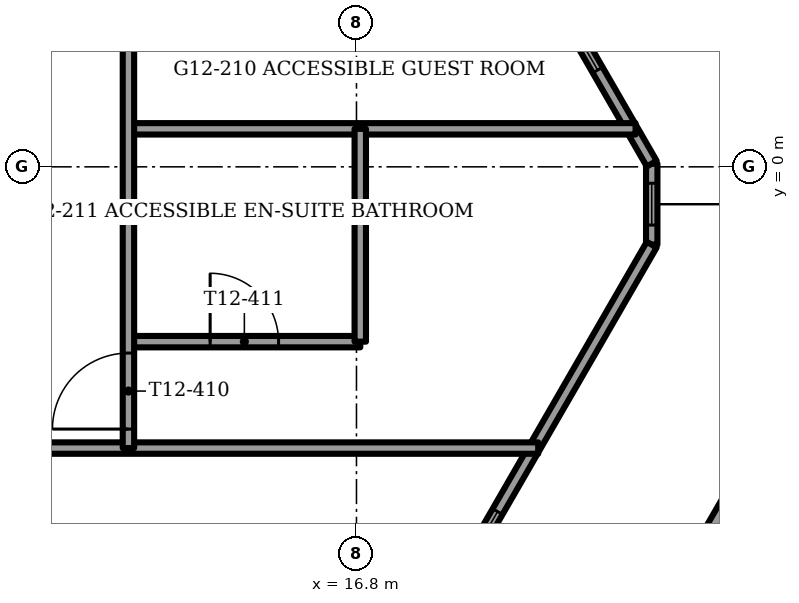
"""IFC4 building model, lengths in metres.
Left out: names, types, materials, properties, quantities, classifications, styles, units other than length and angle.
Written with IfcOpenShell. Run it as: python <this file> out.ifc"""

import sys

from ifc_helpers import new_model, si_unit, direction, frame, frame_2d, origin, place, context, subcontext, project, spatial, rectangle, extrude, element, fill, save


model = new_model("IFC4")
c1 = context("Model", 3, precision=1e-05, world=origin(), true_north=direction((0.0, 1.0)))
c2 = subcontext(c1, "Body", "Model", "MODEL_VIEW")
j1 = project(units=[si_unit("LENGTHUNIT", "METRE"), si_unit("PLANEANGLEUNIT", "RADIAN")], contexts=[c1])
p1 = place(None, origin())
s1 = spatial("IfcSite", under=j1, at=p1, CompositionType="ELEMENT")
p2 = place(p1, origin())
s2 = spatial("IfcBuilding", under=s1, at=p2, CompositionType="ELEMENT")
p3 = place(p2, frame((0.0, 0.0, 50.5)))
s3 = spatial("IfcBuildingStorey", under=s2, at=p3, CompositionType="ELEMENT", Elevation=50.5)
p4 = place(p3, frame((20.922, -6.461, 0.0), z_axis=(0.0, 0.0, 1.0), x_axis=(0.500007141444, 0.86602128063, 0.0)))
e1 = element("IfcWall", 1, at=p4, inside=s3, PredefinedType="PARAPET", context=c2, shape_type="SweptSolid", body=[
    extrude(rectangle(XDim=6.137, YDim=0.9, at=frame_2d((3.068, 0.0))), origin(), (0.0, 0.0, 1.0), 1.1),
])
p5 = place(p3, frame((23.991, 0.165, 0.0), z_axis=(0.0, 0.0, 1.0), x_axis=(-0.499983583635, 0.86603488157, 0.0)))
e2 = element("IfcWall", 2, at=p5, inside=s3, PredefinedType="PARAPET", context=c2, shape_type="SweptSolid", body=[
    extrude(rectangle(XDim=6.987, YDim=0.9, at=frame_2d((3.494, 0.0))), origin(), (0.0, 0.0, 1.0), 1.1),
])
p6 = place(p3, frame((11.229, -17.402, 0.0), z_axis=(0.0, 0.0, 1.0), x_axis=(0.500004426522, 0.866022848116, 0.0)))
e3 = element("IfcWall", 3, at=p6, inside=s3, PredefinedType="SOLIDWALL", context=c2, shape_type="SweptSolid", body=[
    extrude(rectangle(XDim=18.912, YDim=0.15, at=frame_2d((9.456, 0.0))), origin(), (0.0, 0.0, 1.0), 3.45),
])
p7 = place(p6, frame((1.356, 0.0, 0.15)))
e4 = element("IfcOpeningElement", 4, at=p7, cuts=e3, PredefinedType="OPENING", context=c2, shape_type="SweptSolid", body=[
    extrude(rectangle(XDim=1.8, YDim=2.85, at=frame_2d((0.9, 1.425))), frame((0.0, 0.075, 0.0), z_axis=(0.0, -1.0, 0.0), x_axis=(1.0, 0.0, 0.0)), (0.0, 0.0, 1.0), 0.15),
])
p8 = place(p6, frame((3.456, 0.0, 0.0)))
e5 = element("IfcOpeningElement", 5, at=p8, cuts=e3, PredefinedType="OPENING", context=c2, shape_type="SweptSolid", body=[
    extrude(rectangle(XDim=1.5, YDim=2.4, at=frame_2d((0.75, 1.2))), frame((0.0, 0.075, 0.0), z_axis=(0.0, -1.0, 0.0), x_axis=(1.0, 0.0, 0.0)), (0.0, 0.0, 1.0), 0.15),
])
p9 = place(p6, frame((5.556, 0.0, 0.15)))
e6 = element("IfcOpeningElement", 6, at=p9, cuts=e3, PredefinedType="OPENING", context=c2, shape_type="SweptSolid", body=[
    extrude(rectangle(XDim=1.8, YDim=2.85, at=frame_2d((0.9, 1.425))), frame((0.0, 0.075, 0.0), z_axis=(0.0, -1.0, 0.0), x_axis=(1.0, 0.0, 0.0)), (0.0, 0.0, 1.0), 0.15),
])
p10 = place(p6, frame((7.656, 0.0, 0.0)))
e7 = element("IfcOpeningElement", 7, at=p10, cuts=e3, PredefinedType="OPENING", context=c2, shape_type="SweptSolid", body=[
    extrude(rectangle(XDim=1.5, YDim=2.4, at=frame_2d((0.75, 1.2))), frame((0.0, 0.075, 0.0), z_axis=(0.0, -1.0, 0.0), x_axis=(1.0, 0.0, 0.0)), (0.0, 0.0, 1.0), 0.15),
])
p11 = place(p6, frame((9.756, 0.0, 0.15)))
e8 = element("IfcOpeningElement", 8, at=p11, cuts=e3, PredefinedType="OPENING", context=c2, shape_type="SweptSolid", body=[
    extrude(rectangle(XDim=1.8, YDim=2.85, at=frame_2d((0.9, 1.425))), frame((0.0, 0.075, 0.0), z_axis=(0.0, -1.0, 0.0), x_axis=(1.0, 0.0, 0.0)), (0.0, 0.0, 1.0), 0.15),
])
p12 = place(p6, frame((11.856, 0.0, 0.0)))
e9 = element("IfcOpeningElement", 9, at=p12, cuts=e3, PredefinedType="OPENING", context=c2, shape_type="SweptSolid", body=[
    extrude(rectangle(XDim=1.5, YDim=2.4, at=frame_2d((0.75, 1.2))), frame((0.0, 0.075, 0.0), z_axis=(0.0, -1.0, 0.0), x_axis=(1.0, 0.0, 0.0)), (0.0, 0.0, 1.0), 0.15),
])
p13 = place(p6, frame((13.956, 0.0, 0.15)))
e10 = element("IfcOpeningElement", 10, at=p13, cuts=e3, PredefinedType="OPENING", context=c2, shape_type="SweptSolid", body=[
    extrude(rectangle(XDim=0.9, YDim=2.85, at=frame_2d((0.45, 1.425))), frame((0.0, 0.075, 0.0), z_axis=(0.0, -1.0, 0.0), x_axis=(1.0, 0.0, 0.0)), (0.0, 0.0, 1.0), 0.15),
])
p14 = place(p3, frame((20.685, 0.042, 0.0), z_axis=(0.0, 0.0, 1.0), x_axis=(-0.49999960747, 0.866025630412, 0.0)))
e11 = element("IfcWall", 11, at=p14, inside=s3, PredefinedType="SOLIDWALL", context=c2, shape_type="SweptSolid", body=[
    extrude(rectangle(XDim=23.384, YDim=0.15, at=frame_2d((11.692, 0.0))), origin(), (0.0, 0.0, 1.0), 3.45),
])
p15 = place(p14, frame((4.491, 0.0, 0.15)))
e12 = element("IfcOpeningElement", 12, at=p15, cuts=e11, PredefinedType="OPENING", context=c2, shape_type="SweptSolid", body=[
    extrude(rectangle(XDim=1.8, YDim=2.85, at=frame_2d((0.9, 1.425))), frame((0.0, 0.075, 0.0), z_axis=(0.0, -1.0, 0.0), x_axis=(1.0, 0.0, 0.0)), (0.0, 0.0, 1.0), 0.15),
])
p16 = place(p14, frame((6.406, 0.0, 0.15)))
e13 = element("IfcOpeningElement", 13, at=p16, cuts=e11, PredefinedType="OPENING", context=c2, shape_type="SweptSolid", body=[
    extrude(rectangle(XDim=1.5, YDim=2.85, at=frame_2d((0.75, 1.425))), frame((0.0, 0.075, 0.0), z_axis=(0.0, -1.0, 0.0), x_axis=(1.0, 0.0, 0.0)), (0.0, 0.0, 1.0), 0.15),
])
p17 = place(p14, frame((8.506, 0.0, 0.15)))
e14 = element("IfcOpeningElement", 14, at=p17, cuts=e11, PredefinedType="OPENING", context=c2, shape_type="SweptSolid", body=[
    extrude(rectangle(XDim=1.8, YDim=2.85, at=frame_2d((0.9, 1.425))), frame((0.0, 0.075, 0.0), z_axis=(0.0, -1.0, 0.0), x_axis=(1.0, 0.0, 0.0)), (0.0, 0.0, 1.0), 0.15),
])
p18 = place(p14, frame((10.606, 0.0, 0.15)))
e15 = element("IfcOpeningElement", 15, at=p18, cuts=e11, PredefinedType="OPENING", context=c2, shape_type="SweptSolid", body=[
    extrude(rectangle(XDim=1.5, YDim=2.85, at=frame_2d((0.75, 1.425))), frame((0.0, 0.075, 0.0), z_axis=(0.0, -1.0, 0.0), x_axis=(1.0, 0.0, 0.0)), (0.0, 0.0, 1.0), 0.15),
])
p19 = place(p14, frame((14.806, 0.0, 0.15)))
e16 = element("IfcOpeningElement", 16, at=p19, cuts=e11, PredefinedType="OPENING", context=c2, shape_type="SweptSolid", body=[
    extrude(rectangle(XDim=1.5, YDim=2.85, at=frame_2d((0.75, 1.425))), frame((0.0, 0.075, 0.0), z_axis=(0.0, -1.0, 0.0), x_axis=(1.0, 0.0, 0.0)), (0.0, 0.0, 1.0), 0.15),
])
p20 = place(p14, frame((18.861, 0.0, 0.15)))
e17 = element("IfcOpeningElement", 17, at=p20, cuts=e11, PredefinedType="OPENING", context=c2, shape_type="SweptSolid", body=[
    extrude(rectangle(XDim=1.5, YDim=2.85, at=frame_2d((0.75, 1.425))), frame((0.0, 0.075, 0.0), z_axis=(0.0, -1.0, 0.0), x_axis=(1.0, 0.0, 0.0)), (0.0, 0.0, 1.0), 0.15),
])
p21 = place(p14, frame((1.422, 0.0, 0.15)))
e18 = element("IfcOpeningElement", 18, at=p21, cuts=e11, PredefinedType="OPENING", context=c2, shape_type="SweptSolid", body=[
    extrude(rectangle(XDim=1.8, YDim=2.73, at=frame_2d((0.9, 1.365))), frame((0.0, 0.075, 0.0), z_axis=(0.0, -1.0, 0.0), x_axis=(1.0, 0.0, 0.0)), (0.0, 0.0, 1.0), 0.15),
])
p22 = place(p14, frame((21.247, 0.0, 0.15)))
e19 = element("IfcOpeningElement", 19, at=p22, cuts=e11, PredefinedType="OPENING", context=c2, shape_type="SweptSolid", body=[
    extrude(rectangle(XDim=1.8, YDim=2.73, at=frame_2d((0.9, 1.365))), frame((0.0, 0.075, 0.0), z_axis=(0.0, -1.0, 0.0), x_axis=(1.0, 0.0, 0.0)), (0.0, 0.0, 1.0), 0.15),
])
p23 = place(p3, frame((20.685, -1.023, 0.0), z_axis=(0.0, 0.0, 1.0), x_axis=(0.0, 1.0, 0.0)))
e20 = element("IfcWall", 20, at=p23, inside=s3, PredefinedType="SOLIDWALL", context=c2, shape_type="SweptSolid", body=[
    extrude(rectangle(XDim=1.065, YDim=0.15, at=frame_2d((0.532, 0.0))), origin(), (0.0, 0.0, 1.0), 3.45),
])
p24 = place(p23, frame((0.258, 0.0, 0.15)))
e21 = element("IfcOpeningElement", 21, at=p24, cuts=e20, PredefinedType="OPENING", context=c2, shape_type="SweptSolid", body=[
    extrude(rectangle(XDim=0.55, YDim=2.85, at=frame_2d((0.275, 1.425))), frame((0.0, 0.075, 0.0), z_axis=(0.0, -1.0, 0.0), x_axis=(1.0, 0.0, 0.0)), (0.0, 0.0, 1.0), 0.15),
])
p25 = place(p3, frame((9.16, -3.7, 0.0), z_axis=(0.0, 0.0, 1.0), x_axis=(1.0, 0.0, 0.0)))
e22 = element("IfcWall", 22, at=p25, inside=s3, PredefinedType="PARTITIONING", context=c2, shape_type="SweptSolid", body=[
    extrude(rectangle(XDim=10.031, YDim=0.15, at=frame_2d((5.016, 0.0))), origin(), (0.0, 0.0, 1.0), 3.45),
])
p26 = place(p25, frame((1.84, 0.0, 0.0)))
e23 = element("IfcOpeningElement", 23, at=p26, cuts=e22, PredefinedType="OPENING", context=c2, shape_type="SweptSolid", body=[
    extrude(rectangle(XDim=1.0, YDim=2.1, at=frame_2d((0.5, 1.05))), frame((0.0, 0.075, 0.0), z_axis=(0.0, -1.0, 0.0), x_axis=(1.0, 0.0, 0.0)), (0.0, 0.0, 1.0), 0.15),
])
p27 = place(p3, frame((13.8, -2.3, 0.0), z_axis=(0.0, 0.0, 1.0), x_axis=(1.0, 0.0, 0.0)))
e24 = element("IfcWall", 24, at=p27, inside=s3, PredefinedType="PARTITIONING", context=c2, shape_type="SweptSolid", body=[
    extrude(rectangle(XDim=3.05, YDim=0.15, at=frame_2d((1.525, 0.0))), origin(), (0.0, 0.0, 1.0), 3.45),
])
p28 = place(p27, frame((1.075, 0.0, 0.0)))
e25 = element("IfcOpeningElement", 25, at=p28, cuts=e24, PredefinedType="OPENING", context=c2, shape_type="SweptSolid", body=[
    extrude(rectangle(XDim=0.9, YDim=2.1, at=frame_2d((0.45, 1.05))), frame((0.0, 0.075, 0.0), z_axis=(0.0, -1.0, 0.0), x_axis=(1.0, 0.0, 0.0)), (0.0, 0.0, 1.0), 0.15),
])
p29 = place(p3, frame((13.8, 0.5, 0.0), z_axis=(0.0, 0.0, 1.0), x_axis=(1.0, 0.0, 0.0)))
e26 = element("IfcWall", 26, at=p29, inside=s3, PredefinedType="PARTITIONING", context=c2, shape_type="SweptSolid", body=[
    extrude(rectangle(XDim=6.672, YDim=0.15, at=frame_2d((3.336, 0.0))), origin(), (0.0, 0.0, 1.0), 3.45),
])
p30 = place(p3, frame((16.85, -2.3, 0.0), z_axis=(0.0, 0.0, 1.0), x_axis=(0.0, 1.0, 0.0)))
e27 = element("IfcWall", 27, at=p30, inside=s3, PredefinedType="PARTITIONING", context=c2, shape_type="SweptSolid", body=[
    extrude(rectangle(XDim=2.8, YDim=0.15, at=frame_2d((1.4, 0.0))), origin(), (0.0, 0.0, 1.0), 3.45),
])
p31 = place(p3, frame((13.8, -3.7, 0.0), z_axis=(0.0, 0.0, 1.0), x_axis=(0.0, 1.0, 0.0)))
e28 = element("IfcWall", 28, at=p31, inside=s3, PredefinedType="PARTITIONING", context=c2, shape_type="SweptSolid", body=[
    extrude(rectangle(XDim=15.756, YDim=0.15, at=frame_2d((7.878, 0.0))), origin(), (0.0, 0.0, 1.0), 3.45),
])
p32 = place(p31, frame((0.25, 0.0, 0.0)))
e29 = element("IfcOpeningElement", 29, at=p32, cuts=e28, PredefinedType="OPENING", context=c2, shape_type="SweptSolid", body=[
    extrude(rectangle(XDim=1.0, YDim=2.1, at=frame_2d((0.5, 1.05))), frame((0.0, 0.075, 0.0), z_axis=(0.0, -1.0, 0.0), x_axis=(1.0, 0.0, 0.0)), (0.0, 0.0, 1.0), 0.15),
])
p33 = place(p31, frame((5.275, 0.0, 0.0)))
e30 = element("IfcOpeningElement", 30, at=p33, cuts=e28, PredefinedType="OPENING", context=c2, shape_type="SweptSolid", body=[
    extrude(rectangle(XDim=1.0, YDim=2.1, at=frame_2d((0.5, 1.05))), frame((0.0, 0.075, 0.0), z_axis=(0.0, -1.0, 0.0), x_axis=(1.0, 0.0, 0.0)), (0.0, 0.0, 1.0), 0.15),
])
p34 = place(p31, frame((10.933, 0.0, 0.0)))
e31 = element("IfcOpeningElement", 31, at=p34, cuts=e28, PredefinedType="OPENING", context=c2, shape_type="SweptSolid", body=[
    extrude(rectangle(XDim=1.0, YDim=2.1, at=frame_2d((0.5, 1.05))), frame((0.0, 0.075, 0.0), z_axis=(0.0, -1.0, 0.0), x_axis=(1.0, 0.0, 0.0)), (0.0, 0.0, 1.0), 0.15),
])
p35 = place(p13, origin())
e32 = element("IfcWindow", 32, at=p35, inside=s3, PartitioningType="SINGLE_PANEL", PredefinedType="WINDOW", context=c2, shape_type="SweptSolid", body=[
    extrude(rectangle(XDim=0.9, YDim=2.85, at=frame_2d((0.45, 1.425))), frame((0.0, 0.03, 0.0), z_axis=(0.0, -1.0, 0.0), x_axis=(1.0, 0.0, 0.0)), (0.0, 0.0, 1.0), 0.06),
])
fill(e10, e32)
p36 = place(p21, origin())
e33 = element("IfcWindow", 33, at=p36, inside=s3, PartitioningType="SINGLE_PANEL", PredefinedType="WINDOW", context=c2, shape_type="SweptSolid", body=[
    extrude(rectangle(XDim=1.8, YDim=2.73, at=frame_2d((0.9, 1.365))), frame((0.0, 0.03, 0.0), z_axis=(0.0, -1.0, 0.0), x_axis=(1.0, 0.0, 0.0)), (0.0, 0.0, 1.0), 0.06),
])
fill(e18, e33)
p37 = place(p24, origin())
e34 = element("IfcWindow", 34, at=p37, inside=s3, PartitioningType="SINGLE_PANEL", PredefinedType="WINDOW", context=c2, shape_type="SweptSolid", body=[
    extrude(rectangle(XDim=0.55, YDim=2.85, at=frame_2d((0.275, 1.425))), frame((0.0, 0.03, 0.0), z_axis=(0.0, -1.0, 0.0), x_axis=(1.0, 0.0, 0.0)), (0.0, 0.0, 1.0), 0.06),
])
fill(e21, e34)
p38 = place(p32, origin())
e35 = element("IfcDoor", 35, at=p38, inside=s3, OperationType="SINGLE_SWING_LEFT", PredefinedType="DOOR", context=c2, shape_type="SweptSolid", body=[
    extrude(rectangle(XDim=1.0, YDim=2.1, at=frame_2d((0.5, 1.05))), frame((0.0, 0.025, 0.0), z_axis=(0.0, -1.0, 0.0), x_axis=(1.0, 0.0, 0.0)), (0.0, 0.0, 1.0), 0.05),
])
fill(e29, e35)
p39 = place(p28, origin())
e36 = element("IfcDoor", 36, at=p39, inside=s3, OperationType="SINGLE_SWING_LEFT", PredefinedType="DOOR", context=c2, shape_type="SweptSolid", body=[
    extrude(rectangle(XDim=0.9, YDim=2.1, at=frame_2d((0.45, 1.05))), frame((0.0, 0.025, 0.0), z_axis=(0.0, -1.0, 0.0), x_axis=(1.0, 0.0, 0.0)), (0.0, 0.0, 1.0), 0.05),
])
fill(e25, e36)
save(model, sys.argv[1])
